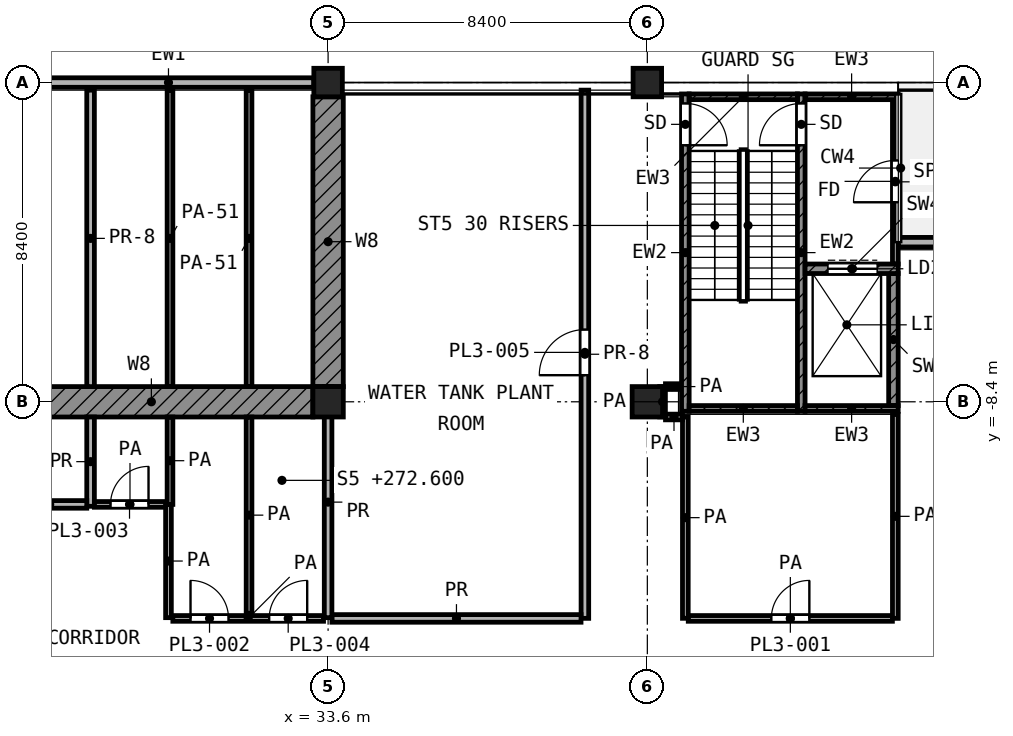
"""IFC4 building model, lengths in metres.
Left out: names, types, materials, properties, quantities, classifications, styles, units other than length and angle.
Written with IfcOpenShell. Run it as: python <this file> out.ifc"""

import sys

from ifc_helpers import new_model, si_unit, direction, frame, frame_2d, origin, origin_2d, place, context, subcontext, project, spatial, rectangle, extrude, element, fill, save


model = new_model("IFC4")
c1 = context("Model", 3, precision=1e-05, world=origin(), true_north=direction((0.0, 1.0)))
c2 = subcontext(c1, "Body", "Model", "MODEL_VIEW")
j1 = project(units=[si_unit("LENGTHUNIT", "METRE"), si_unit("PLANEANGLEUNIT", "RADIAN")], contexts=[c1])
p1 = place(None, origin())
s1 = spatial("IfcSite", under=j1, at=p1, CompositionType="ELEMENT")
p2 = place(p1, origin())
s2 = spatial("IfcBuilding", under=s1, at=p2, CompositionType="ELEMENT")
p3 = place(p2, frame((0.0, 0.0, 272.6)))
s3 = spatial("IfcBuildingStorey", under=s2, at=p3, CompositionType="ELEMENT", Elevation=272.6)
for number, where, z_axis, x_axis in (
    (1, (33.6, 0.0, 0.0), (0.0, 0.0, 1.0), (1.0, 0.0, 0.0)),
    (2, (42.0, 0.0, 0.0), (0.0, 0.0, 1.0), (1.0, 0.0, 0.0)),
):
    element("IfcColumn", number, at=place(p3, frame(where, z_axis=z_axis, x_axis=x_axis)), inside=s3, PredefinedType="COLUMN", context=c2, shape_type="SweptSolid", body=[
        extrude(rectangle(XDim=0.75, YDim=0.75, at=origin_2d()), origin(), (0.0, 0.0, 1.0), 5.0),
    ])
for number, where, z_axis, x_axis in (
    (3, (33.6, -8.4, 0.0), (0.0, 0.0, 1.0), (1.0, 0.0, 0.0)),
    (4, (42.0, -8.4, 0.0), (0.0, 0.0, 1.0), (1.0, 0.0, 0.0)),
):
    element("IfcColumn", number, at=place(p3, frame(where, z_axis=z_axis, x_axis=x_axis)), inside=s3, PredefinedType="COLUMN", context=c2, shape_type="SweptSolid", body=[
        extrude(rectangle(XDim=0.8, YDim=0.8, at=origin_2d()), origin(), (0.0, 0.0, 1.0), 5.0),
    ])
p4 = place(p3, frame((24.7, -8.4, 0.0), z_axis=(0.0, 0.0, 1.0), x_axis=(1.0, 0.0, 0.0)))
e5 = element("IfcWall", 5, at=p4, inside=s3, PredefinedType="SHEAR", context=c2, shape_type="SweptSolid", body=[
    extrude(rectangle(XDim=8.5, YDim=0.8, at=frame_2d((4.25, 0.0))), origin(), (0.0, 0.0, 1.0), 4.4),
])
p5 = place(p3, frame((33.6, -0.375, 0.0), z_axis=(0.0, 0.0, 1.0), x_axis=(0.0, -1.0, 0.0)))
e6 = element("IfcWall", 6, at=p5, inside=s3, PredefinedType="SHEAR", context=c2, shape_type="SweptSolid", body=[
    extrude(rectangle(XDim=7.625, YDim=0.8, at=frame_2d((3.812, 0.0))), origin(), (0.0, 0.0, 1.0), 4.4),
])
p6 = place(p3, frame((55.26, -4.2, 0.0), z_axis=(0.0, 0.0, 1.0), x_axis=(-1.0, 0.0, 0.0)))
e7 = element("IfcWall", 7, at=p6, inside=s3, PredefinedType="SOLIDWALL", context=c2, shape_type="SweptSolid", body=[
    extrude(rectangle(XDim=6.659, YDim=0.25, at=frame_2d((3.33, 0.0))), origin(), (0.0, 0.0, 1.0), 4.4),
])
p7 = place(p6, frame((2.83, 0.0, 0.0)))
e8 = element("IfcOpeningElement", 8, at=p7, cuts=e7, PredefinedType="OPENING", context=c2, shape_type="SweptSolid", body=[
    extrude(rectangle(XDim=1.0, YDim=2.1, at=frame_2d((0.5, 1.05))), frame((0.0, 0.135, 0.0), z_axis=(0.0, -1.0, 0.0), x_axis=(1.0, 0.0, 0.0)), (0.0, 0.0, 1.0), 0.27),
])
p8 = place(p3, frame((33.225, 0.0, 0.0), z_axis=(0.0, 0.0, 1.0), x_axis=(-1.0, 0.0, 0.0)))
e9 = element("IfcWall", 9, at=p8, inside=s3, PredefinedType="SOLIDWALL", context=c2, shape_type="SweptSolid", body=[
    extrude(rectangle(XDim=7.65, YDim=0.25, at=frame_2d((3.825, 0.0))), origin(), (0.0, 0.0, 1.0), 3.3),
])
p9 = place(p3, frame((43.0, -8.65, 0.0), z_axis=(0.0, 0.0, 1.0), x_axis=(0.0, 1.0, 0.0)))
e10 = element("IfcWall", 10, at=p9, inside=s3, PredefinedType="SHEAR", context=c2, shape_type="SweptSolid", body=[
    extrude(rectangle(XDim=8.35, YDim=0.2, at=frame_2d((4.175, 0.0))), origin(), (0.0, 0.0, 1.0), 4.4),
])
p10 = place(p9, frame((7.0, 0.0, 0.0)))
e11 = element("IfcOpeningElement", 11, at=p10, cuts=e10, PredefinedType="OPENING", context=c2, shape_type="SweptSolid", body=[
    extrude(rectangle(XDim=1.1, YDim=2.1, at=frame_2d((0.55, 1.05))), frame((0.0, 0.11, 0.0), z_axis=(0.0, -1.0, 0.0), x_axis=(1.0, 0.0, 0.0)), (0.0, 0.0, 1.0), 0.22),
])
p11 = place(p3, frame((46.05, -8.65, 0.0), z_axis=(0.0, 0.0, 1.0), x_axis=(0.0, 1.0, 0.0)))
e12 = element("IfcWall", 12, at=p11, inside=s3, PredefinedType="SHEAR", context=c2, shape_type="SweptSolid", body=[
    extrude(rectangle(XDim=8.35, YDim=0.2, at=frame_2d((4.175, 0.0))), origin(), (0.0, 0.0, 1.0), 4.4),
])
p12 = place(p11, frame((7.0, 0.0, 0.0)))
e13 = element("IfcOpeningElement", 13, at=p12, cuts=e12, PredefinedType="OPENING", context=c2, shape_type="SweptSolid", body=[
    extrude(rectangle(XDim=1.1, YDim=2.1, at=frame_2d((0.55, 1.05))), frame((0.0, 0.11, 0.0), z_axis=(0.0, -1.0, 0.0), x_axis=(1.0, 0.0, 0.0)), (0.0, 0.0, 1.0), 0.22),
])
p13 = place(p3, frame((43.1, -0.375, 0.0), z_axis=(0.0, 0.0, 1.0), x_axis=(1.0, 0.0, 0.0)))
e14 = element("IfcWall", 14, at=p13, inside=s3, PredefinedType="SHEAR", context=c2, shape_type="SweptSolid", body=[
    extrude(rectangle(XDim=2.85, YDim=0.15, at=frame_2d((1.425, 0.0))), origin(), (0.0, 0.0, 1.0), 4.4),
])
p14 = place(p3, frame((46.15, -0.375, 0.0), z_axis=(0.0, 0.0, 1.0), x_axis=(1.0, 0.0, 0.0)))
e15 = element("IfcWall", 15, at=p14, inside=s3, PredefinedType="SHEAR", context=c2, shape_type="SweptSolid", body=[
    extrude(rectangle(XDim=2.45, YDim=0.15, at=frame_2d((1.225, 0.0))), origin(), (0.0, 0.0, 1.0), 4.4),
])
p15 = place(p3, frame((43.1, -8.575, 0.0), z_axis=(0.0, 0.0, 1.0), x_axis=(1.0, 0.0, 0.0)))
e16 = element("IfcWall", 16, at=p15, inside=s3, PredefinedType="SHEAR", context=c2, shape_type="SweptSolid", body=[
    extrude(rectangle(XDim=2.85, YDim=0.15, at=frame_2d((1.425, 0.0))), origin(), (0.0, 0.0, 1.0), 4.4),
])
p16 = place(p3, frame((46.15, -8.575, 0.0), z_axis=(0.0, 0.0, 1.0), x_axis=(1.0, 0.0, 0.0)))
e17 = element("IfcWall", 17, at=p16, inside=s3, PredefinedType="SHEAR", context=c2, shape_type="SweptSolid", body=[
    extrude(rectangle(XDim=2.45, YDim=0.15, at=frame_2d((1.225, 0.0))), origin(), (0.0, 0.0, 1.0), 4.4),
])
p17 = place(p3, frame((46.15, -4.9, 0.0), z_axis=(0.0, 0.0, 1.0), x_axis=(1.0, 0.0, 0.0)))
e18 = element("IfcWall", 18, at=p17, inside=s3, PredefinedType="SHEAR", context=c2, shape_type="SweptSolid", body=[
    extrude(rectangle(XDim=2.45, YDim=0.25, at=frame_2d((1.225, 0.0))), origin(), (0.0, 0.0, 1.0), 4.4),
])
p18 = place(p17, frame((0.6, 0.0, 0.0)))
e19 = element("IfcOpeningElement", 19, at=p18, cuts=e18, PredefinedType="OPENING", context=c2, shape_type="SweptSolid", body=[
    extrude(rectangle(XDim=1.3, YDim=2.1, at=frame_2d((0.65, 1.05))), frame((0.0, 0.135, 0.0), z_axis=(0.0, -1.0, 0.0), x_axis=(1.0, 0.0, 0.0)), (0.0, 0.0, 1.0), 0.27),
])
p19 = place(p3, frame((48.475, -8.5, 0.0), z_axis=(0.0, 0.0, 1.0), x_axis=(0.0, 1.0, 0.0)))
e20 = element("IfcWall", 20, at=p19, inside=s3, PredefinedType="SHEAR", context=c2, shape_type="SweptSolid", body=[
    extrude(rectangle(XDim=3.475, YDim=0.25, at=frame_2d((1.738, 0.0))), origin(), (0.0, 0.0, 1.0), 4.4),
])
p20 = place(p3, frame((48.525, -4.775, 0.0), z_axis=(0.0, 0.0, 1.0), x_axis=(0.0, 1.0, 0.0)))
e21 = element("IfcWall", 21, at=p20, inside=s3, PredefinedType="PARTITIONING", context=c2, shape_type="SweptSolid", body=[
    extrude(rectangle(XDim=4.325, YDim=0.15, at=frame_2d((2.163, 0.0))), origin(), (0.0, 0.0, 1.0), 4.4),
])
p21 = place(p20, frame((1.625, 0.0, 0.0)))
e22 = element("IfcOpeningElement", 22, at=p21, cuts=e21, PredefinedType="OPENING", context=c2, shape_type="SweptSolid", body=[
    extrude(rectangle(XDim=1.1, YDim=2.1, at=frame_2d((0.55, 1.05))), frame((0.0, 0.085, 0.0), z_axis=(0.0, -1.0, 0.0), x_axis=(1.0, 0.0, 0.0)), (0.0, 0.0, 1.0), 0.17),
])
p22 = place(p3, frame((29.515, -14.1, 0.0), z_axis=(0.0, 0.0, 1.0), x_axis=(1.0, 0.0, 0.0)))
e23 = element("IfcWall", 23, at=p22, inside=s3, PredefinedType="PARTITIONING", context=c2, shape_type="SweptSolid", body=[
    extrude(rectangle(XDim=3.965, YDim=0.15, at=frame_2d((1.982, 0.0))), origin(), (0.0, 0.0, 1.0), 4.4),
])
p23 = place(p22, frame((0.465, 0.0, 0.0)))
e24 = element("IfcOpeningElement", 24, at=p23, cuts=e23, PredefinedType="OPENING", context=c2, shape_type="SweptSolid", body=[
    extrude(rectangle(XDim=1.0, YDim=2.1, at=frame_2d((0.5, 1.05))), frame((0.0, 0.085, 0.0), z_axis=(0.0, -1.0, 0.0), x_axis=(1.0, 0.0, 0.0)), (0.0, 0.0, 1.0), 0.17),
])
p24 = place(p22, frame((2.535, 0.0, 0.0)))
e25 = element("IfcOpeningElement", 25, at=p24, cuts=e23, PredefinedType="OPENING", context=c2, shape_type="SweptSolid", body=[
    extrude(rectangle(XDim=1.0, YDim=2.1, at=frame_2d((0.5, 1.05))), frame((0.0, 0.085, 0.0), z_axis=(0.0, -1.0, 0.0), x_axis=(1.0, 0.0, 0.0)), (0.0, 0.0, 1.0), 0.17),
])
p25 = place(p3, frame((43.077, -14.1, 0.0), z_axis=(0.0, 0.0, 1.0), x_axis=(1.0, 0.0, 0.0)))
e26 = element("IfcWall", 26, at=p25, inside=s3, PredefinedType="PARTITIONING", context=c2, shape_type="SweptSolid", body=[
    extrude(rectangle(XDim=5.371, YDim=0.15, at=frame_2d((2.686, 0.0))), origin(), (0.0, 0.0, 1.0), 4.4),
])
p26 = place(p25, frame((2.186, 0.0, 0.0)))
e27 = element("IfcOpeningElement", 27, at=p26, cuts=e26, PredefinedType="OPENING", context=c2, shape_type="SweptSolid", body=[
    extrude(rectangle(XDim=1.0, YDim=2.1, at=frame_2d((0.5, 1.05))), frame((0.0, 0.085, 0.0), z_axis=(0.0, -1.0, 0.0), x_axis=(1.0, 0.0, 0.0)), (0.0, 0.0, 1.0), 0.17),
])
p27 = place(p3, frame((27.45, -11.1, 0.0), z_axis=(0.0, 0.0, 1.0), x_axis=(1.0, 0.0, 0.0)))
e28 = element("IfcWall", 28, at=p27, inside=s3, PredefinedType="PARTITIONING", context=c2, shape_type="SweptSolid", body=[
    extrude(rectangle(XDim=1.875, YDim=0.15, at=frame_2d((0.938, 0.0))), origin(), (0.0, 0.0, 1.0), 4.4),
])
p28 = place(p27, frame((0.425, 0.0, 0.0)))
e29 = element("IfcOpeningElement", 29, at=p28, cuts=e28, PredefinedType="OPENING", context=c2, shape_type="SweptSolid", body=[
    extrude(rectangle(XDim=1.0, YDim=2.1, at=frame_2d((0.5, 1.05))), frame((0.0, 0.085, 0.0), z_axis=(0.0, -1.0, 0.0), x_axis=(1.0, 0.0, 0.0)), (0.0, 0.0, 1.0), 0.17),
])
p29 = place(p3, frame((42.478, -8.8, 0.0), z_axis=(0.0, 0.0, 1.0), x_axis=(1.0, 0.0, 0.0)))
e30 = element("IfcWall", 30, at=p29, inside=s3, PredefinedType="PARTITIONING", context=c2, shape_type="SweptSolid", body=[
    extrude(rectangle(XDim=0.447, YDim=0.15, at=frame_2d((0.224, 0.0))), origin(), (0.0, 0.0, 1.0), 4.4),
])
p30 = place(p3, frame((42.477, -8.0, 0.0), z_axis=(0.0, 0.0, 1.0), x_axis=(1.0, 0.0, 0.0)))
e31 = element("IfcWall", 31, at=p30, inside=s3, PredefinedType="PARTITIONING", context=c2, shape_type="SweptSolid", body=[
    extrude(rectangle(XDim=0.343, YDim=0.15, at=frame_2d((0.171, 0.0))), origin(), (0.0, 0.0, 1.0), 4.4),
])
p31 = place(p3, frame((29.4, -14.08, 0.0), z_axis=(0.0, 0.0, 1.0), x_axis=(0.0, 1.0, 0.0)))
e32 = element("IfcWall", 32, at=p31, inside=s3, PredefinedType="PARTITIONING", context=c2, shape_type="SweptSolid", body=[
    extrude(rectangle(XDim=2.98, YDim=0.15, at=frame_2d((1.49, 0.0))), origin(), (0.0, 0.0, 1.0), 4.4),
])
p32 = place(p3, frame((29.44, -11.1, 0.0), z_axis=(0.0, 0.0, 1.0), x_axis=(0.0, 1.0, 0.0)))
e33 = element("IfcWall", 33, at=p32, inside=s3, PredefinedType="PARTITIONING", context=c2, shape_type="SweptSolid", body=[
    extrude(rectangle(XDim=2.3, YDim=0.15, at=frame_2d((1.15, 0.0))), origin(), (0.0, 0.0, 1.0), 4.4),
])
p33 = place(p3, frame((29.44, -8.001, 0.0), z_axis=(0.0, 0.0, 1.0), x_axis=(0.0, 1.0, 0.0)))
e34 = element("IfcWall", 34, at=p33, inside=s3, PredefinedType="PARTITIONING", context=c2, shape_type="SweptSolid", body=[
    extrude(rectangle(XDim=7.801, YDim=0.15, at=frame_2d((3.9, 0.0))), origin(), (0.0, 0.0, 1.0), 3.3),
])
p34 = place(p3, frame((31.52, -13.965, 0.0), z_axis=(0.0, 0.0, 1.0), x_axis=(0.0, 1.0, 0.0)))
e35 = element("IfcWall", 35, at=p34, inside=s3, PredefinedType="PARTITIONING", context=c2, shape_type="SweptSolid", body=[
    extrude(rectangle(XDim=5.165, YDim=0.15, at=frame_2d((2.583, 0.0))), origin(), (0.0, 0.0, 1.0), 4.4),
])
p35 = place(p3, frame((31.52, -8.001, 0.0), z_axis=(0.0, 0.0, 1.0), x_axis=(0.0, 1.0, 0.0)))
e36 = element("IfcWall", 36, at=p35, inside=s3, PredefinedType="PARTITIONING", context=c2, shape_type="SweptSolid", body=[
    extrude(rectangle(XDim=7.801, YDim=0.15, at=frame_2d((3.9, 0.0))), origin(), (0.0, 0.0, 1.0), 3.3),
])
p36 = place(p3, frame((42.4, -8.797, 0.0), z_axis=(0.0, 0.0, 1.0), x_axis=(0.0, 1.0, 0.0)))
e37 = element("IfcWall", 37, at=p36, inside=s3, PredefinedType="PARTITIONING", context=c2, shape_type="SweptSolid", body=[
    extrude(rectangle(XDim=0.796, YDim=0.15, at=frame_2d((0.398, 0.0))), origin(), (0.0, 0.0, 1.0), 4.4),
])
p37 = place(p3, frame((43.0, -14.097, 0.0), z_axis=(0.0, 0.0, 1.0), x_axis=(0.0, 1.0, 0.0)))
e38 = element("IfcWall", 38, at=p37, inside=s3, PredefinedType="PARTITIONING", context=c2, shape_type="SweptSolid", body=[
    extrude(rectangle(XDim=5.297, YDim=0.15, at=frame_2d((2.648, 0.0))), origin(), (0.0, 0.0, 1.0), 4.4),
])
p38 = place(p3, frame((48.525, -14.098, 0.0), z_axis=(0.0, 0.0, 1.0), x_axis=(0.0, 1.0, 0.0)))
e39 = element("IfcWall", 39, at=p38, inside=s3, PredefinedType="PARTITIONING", context=c2, shape_type="SweptSolid", body=[
    extrude(rectangle(XDim=5.368, YDim=0.15, at=frame_2d((2.684, 0.0))), origin(), (0.0, 0.0, 1.0), 4.4),
])
p39 = place(p3, frame((33.7, -14.1, 0.0), z_axis=(0.0, 0.0, 1.0), x_axis=(1.0, 0.0, 0.0)))
e40 = element("IfcWall", 40, at=p39, inside=s3, PredefinedType="PARTITIONING", context=c2, shape_type="SweptSolid", body=[
    extrude(rectangle(XDim=6.555, YDim=0.2, at=frame_2d((3.277, 0.0))), origin(), (0.0, 0.0, 1.0), 4.4),
])
p40 = place(p3, frame((25.3, -11.1, 0.0), z_axis=(0.0, 0.0, 1.0), x_axis=(1.0, 0.0, 0.0)))
e41 = element("IfcWall", 41, at=p40, inside=s3, PredefinedType="PARTITIONING", context=c2, shape_type="SweptSolid", body=[
    extrude(rectangle(XDim=1.95, YDim=0.2, at=frame_2d((0.975, 0.0))), origin(), (0.0, 0.0, 1.0), 4.4),
])
p41 = place(p3, frame((27.35, -11.15, 0.0), z_axis=(0.0, 0.0, 1.0), x_axis=(0.0, 1.0, 0.0)))
e42 = element("IfcWall", 42, at=p41, inside=s3, PredefinedType="PARTITIONING", context=c2, shape_type="SweptSolid", body=[
    extrude(rectangle(XDim=2.35, YDim=0.2, at=frame_2d((1.175, 0.0))), origin(), (0.0, 0.0, 1.0), 4.4),
])
p42 = place(p3, frame((27.35, -8.001, 0.0), z_axis=(0.0, 0.0, 1.0), x_axis=(0.0, 1.0, 0.0)))
e43 = element("IfcWall", 43, at=p42, inside=s3, PredefinedType="PARTITIONING", context=c2, shape_type="SweptSolid", body=[
    extrude(rectangle(XDim=7.801, YDim=0.2, at=frame_2d((3.9, 0.0))), origin(), (0.0, 0.0, 1.0), 3.3),
])
p43 = place(p3, frame((33.6, -14.08, 0.0), z_axis=(0.0, 0.0, 1.0), x_axis=(0.0, 1.0, 0.0)))
e44 = element("IfcWall", 44, at=p43, inside=s3, PredefinedType="PARTITIONING", context=c2, shape_type="SweptSolid", body=[
    extrude(rectangle(XDim=6.08, YDim=0.2, at=frame_2d((3.04, 0.0))), origin(), (0.0, 0.0, 1.0), 4.4),
])
p44 = place(p3, frame((40.357, -14.098, 0.0), z_axis=(0.0, 0.0, 1.0), x_axis=(0.0, 1.0, 0.0)))
e45 = element("IfcWall", 45, at=p44, inside=s3, PredefinedType="PARTITIONING", context=c2, shape_type="SweptSolid", body=[
    extrude(rectangle(XDim=13.898, YDim=0.2, at=frame_2d((6.949, 0.0))), origin(), (0.0, 0.0, 1.0), 3.3),
])
p45 = place(p44, frame((6.398, 0.0, 0.0)))
e46 = element("IfcOpeningElement", 46, at=p45, cuts=e45, PredefinedType="OPENING", context=c2, shape_type="SweptSolid", body=[
    extrude(rectangle(XDim=1.2, YDim=2.1, at=frame_2d((0.6, 1.05))), frame((0.0, 0.11, 0.0), z_axis=(0.0, -1.0, 0.0), x_axis=(1.0, 0.0, 0.0)), (0.0, 0.0, 1.0), 0.22),
])
p46 = place(p10, frame((1.1, 0.0, 0.0), z_axis=(0.0, 0.0, 1.0), x_axis=(-1.0, 0.0, 0.0)))
e47 = element("IfcDoor", 47, at=p46, inside=s3, OperationType="SINGLE_SWING_LEFT", PredefinedType="DOOR", context=c2, shape_type="SweptSolid", body=[
    extrude(rectangle(XDim=1.1, YDim=2.1, at=frame_2d((0.55, 1.05))), frame((0.0, 0.025, 0.0), z_axis=(0.0, -1.0, 0.0), x_axis=(1.0, 0.0, 0.0)), (0.0, 0.0, 1.0), 0.05),
])
fill(e11, e47)
p47 = place(p12, origin())
e48 = element("IfcDoor", 48, at=p47, inside=s3, OperationType="SINGLE_SWING_LEFT", PredefinedType="DOOR", context=c2, shape_type="SweptSolid", body=[
    extrude(rectangle(XDim=1.1, YDim=2.1, at=frame_2d((0.55, 1.05))), frame((0.0, 0.025, 0.0), z_axis=(0.0, -1.0, 0.0), x_axis=(1.0, 0.0, 0.0)), (0.0, 0.0, 1.0), 0.05),
])
fill(e13, e48)
p48 = place(p18, origin())
e49 = element("IfcDoor", 49, at=p48, inside=s3, OperationType="DOUBLE_DOOR_SLIDING", PredefinedType="DOOR", context=c2, shape_type="SweptSolid", body=[
    extrude(rectangle(XDim=1.3, YDim=2.1, at=frame_2d((0.65, 1.05))), frame((0.0, 0.025, 0.0), z_axis=(0.0, -1.0, 0.0), x_axis=(1.0, 0.0, 0.0)), (0.0, 0.0, 1.0), 0.05),
])
fill(e19, e49)
p49 = place(p21, origin())
e50 = element("IfcDoor", 50, at=p49, inside=s3, OperationType="SINGLE_SWING_LEFT", PredefinedType="DOOR", context=c2, shape_type="SweptSolid", body=[
    extrude(rectangle(XDim=1.1, YDim=2.1, at=frame_2d((0.55, 1.05))), frame((0.0, 0.025, 0.0), z_axis=(0.0, -1.0, 0.0), x_axis=(1.0, 0.0, 0.0)), (0.0, 0.0, 1.0), 0.05),
])
fill(e22, e50)
p50 = place(p45, origin())
e51 = element("IfcDoor", 51, at=p50, inside=s3, OperationType="SINGLE_SWING_LEFT", PredefinedType="DOOR", context=c2, shape_type="SweptSolid", body=[
    extrude(rectangle(XDim=1.2, YDim=2.1, at=frame_2d((0.6, 1.05))), frame((0.0, 0.025, 0.0), z_axis=(0.0, -1.0, 0.0), x_axis=(1.0, 0.0, 0.0)), (0.0, 0.0, 1.0), 0.05),
])
fill(e46, e51)
p51 = place(p26, origin())
e52 = element("IfcDoor", 52, at=p51, inside=s3, OperationType="SINGLE_SWING_RIGHT", PredefinedType="DOOR", context=c2, shape_type="SweptSolid", body=[
    extrude(rectangle(XDim=1.0, YDim=2.1, at=frame_2d((0.5, 1.05))), frame((0.0, 0.025, 0.0), z_axis=(0.0, -1.0, 0.0), x_axis=(1.0, 0.0, 0.0)), (0.0, 0.0, 1.0), 0.05),
])
fill(e27, e52)
p52 = place(p23, origin())
e53 = element("IfcDoor", 53, at=p52, inside=s3, OperationType="SINGLE_SWING_LEFT", PredefinedType="DOOR", context=c2, shape_type="SweptSolid", body=[
    extrude(rectangle(XDim=1.0, YDim=2.1, at=frame_2d((0.5, 1.05))), frame((0.0, 0.025, 0.0), z_axis=(0.0, -1.0, 0.0), x_axis=(1.0, 0.0, 0.0)), (0.0, 0.0, 1.0), 0.05),
])
fill(e24, e53)
p53 = place(p28, origin())
e54 = element("IfcDoor", 54, at=p53, inside=s3, OperationType="SINGLE_SWING_RIGHT", PredefinedType="DOOR", context=c2, shape_type="SweptSolid", body=[
    extrude(rectangle(XDim=1.0, YDim=2.1, at=frame_2d((0.5, 1.05))), frame((0.0, 0.025, 0.0), z_axis=(0.0, -1.0, 0.0), x_axis=(1.0, 0.0, 0.0)), (0.0, 0.0, 1.0), 0.05),
])
fill(e29, e54)
p54 = place(p24, origin())
e55 = element("IfcDoor", 55, at=p54, inside=s3, OperationType="SINGLE_SWING_RIGHT", PredefinedType="DOOR", context=c2, shape_type="SweptSolid", body=[
    extrude(rectangle(XDim=1.0, YDim=2.1, at=frame_2d((0.5, 1.05))), frame((0.0, 0.025, 0.0), z_axis=(0.0, -1.0, 0.0), x_axis=(1.0, 0.0, 0.0)), (0.0, 0.0, 1.0), 0.05),
])
fill(e25, e55)
save(model, sys.argv[1])
